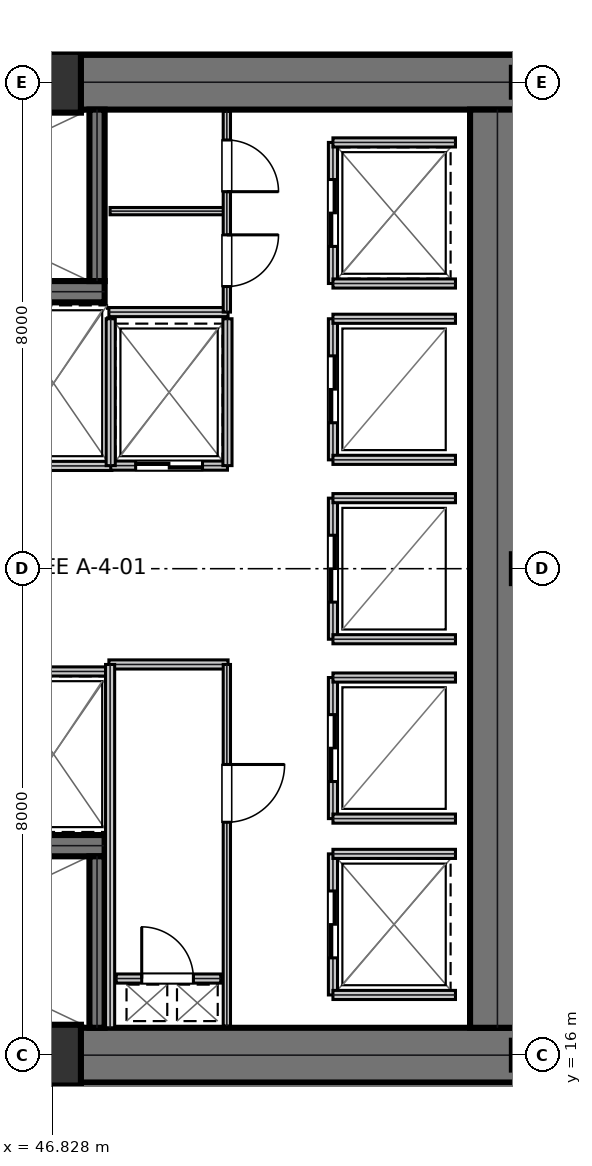
"""IFC4 building model, lengths in metres.
Left out: names, types, materials, properties, quantities, classifications, styles, units other than length and angle.
Written with IfcOpenShell. Run it as: python <this file> out.ifc"""

import sys

from ifc_helpers import new_model, si_unit, direction, frame, frame_2d, origin, origin_2d, place, context, subcontext, project, spatial, rectangle, extrude, element, fill, save


model = new_model("IFC4")
c1 = context("Model", 3, precision=1e-05, world=origin(), true_north=direction((0.0, 1.0)))
c2 = subcontext(c1, "Body", "Model", "MODEL_VIEW")
j1 = project(units=[si_unit("LENGTHUNIT", "METRE"), si_unit("PLANEANGLEUNIT", "RADIAN")], contexts=[c1])
p1 = place(None, origin())
s1 = spatial("IfcSite", under=j1, at=p1, CompositionType="ELEMENT")
p2 = place(p1, origin())
s2 = spatial("IfcBuilding", under=s1, at=p2, CompositionType="ELEMENT")
p3 = place(p2, origin())
s3 = spatial("IfcBuildingStorey", under=s2, at=p3, CompositionType="ELEMENT", Elevation=0.0)
for number, where, z_axis, x_axis in (
    (1, (38.8, 32.0, 0.0), (0.0, 0.0, 1.0), (1.0, 0.0, 0.0)),
    (2, (38.8, 16.0, 0.0), (0.0, 0.0, 1.0), (1.0, 0.0, 0.0)),
):
    element("IfcWall", number, at=place(p3, frame(where, z_axis=z_axis, x_axis=x_axis)), inside=s3, PredefinedType="SHEAR", context=c2, shape_type="SweptSolid", body=[
        extrude(rectangle(XDim=16.0, YDim=0.9, at=frame_2d((8.0, 0.0))), origin(), (0.0, 0.0, 1.0), 5.12),
    ])
p4 = place(p3, frame((54.15, 16.45, 0.0), z_axis=(0.0, 0.0, 1.0), x_axis=(0.0, 1.0, 0.0)))
e3 = element("IfcWall", 3, at=p4, inside=s3, PredefinedType="SHEAR", context=c2, shape_type="SweptSolid", body=[
    extrude(rectangle(XDim=15.1, YDim=0.9, at=frame_2d((7.55, 0.0))), origin(), (0.0, 0.0, 1.0), 5.12),
])
p5 = place(p3, frame((39.98, 28.555, 0.0), z_axis=(0.0, 0.0, 1.0), x_axis=(1.0, 0.0, 0.0)))
e4 = element("IfcWall", 4, at=p5, inside=s3, PredefinedType="SHEAR", context=c2, shape_type="SweptSolid", body=[
    extrude(rectangle(XDim=7.71, YDim=0.35, at=frame_2d((3.855, 0.0))), origin(), (0.0, 0.0, 1.0), 5.12),
])
p6 = place(p5, frame((0.25, 0.0, 0.0)))
e5 = element("IfcOpeningElement", 5, at=p6, cuts=e4, PredefinedType="OPENING", context=c2, shape_type="SweptSolid", body=[
    extrude(rectangle(XDim=1.1, YDim=2.15, at=frame_2d((0.55, 1.075))), frame((0.0, 0.185, 0.0), z_axis=(0.0, -1.0, 0.0), x_axis=(1.0, 0.0, 0.0)), (0.0, 0.0, 1.0), 0.37),
])
p7 = place(p3, frame((39.98, 19.445, 0.0), z_axis=(0.0, 0.0, 1.0), x_axis=(1.0, 0.0, 0.0)))
e6 = element("IfcWall", 6, at=p7, inside=s3, PredefinedType="SHEAR", context=c2, shape_type="SweptSolid", body=[
    extrude(rectangle(XDim=7.71, YDim=0.35, at=frame_2d((3.855, 0.0))), origin(), (0.0, 0.0, 1.0), 5.12),
])
p8 = place(p7, frame((0.25, 0.0, 0.0)))
e7 = element("IfcOpeningElement", 7, at=p8, cuts=e6, PredefinedType="OPENING", context=c2, shape_type="SweptSolid", body=[
    extrude(rectangle(XDim=1.1, YDim=2.15, at=frame_2d((0.55, 1.075))), frame((0.0, 0.185, 0.0), z_axis=(0.0, -1.0, 0.0), x_axis=(1.0, 0.0, 0.0)), (0.0, 0.0, 1.0), 0.37),
])
for number, where, z_axis, x_axis in (
    (8, (47.565, 28.73, 0.0), (0.0, 0.0, 1.0), (0.0, 1.0, 0.0)),
    (9, (47.565, 16.45, 0.0), (0.0, 0.0, 1.0), (0.0, 1.0, 0.0)),
):
    element("IfcWall", number, at=place(p3, frame(where, z_axis=z_axis, x_axis=x_axis)), inside=s3, PredefinedType="SHEAR", context=c2, shape_type="SweptSolid", body=[
        extrude(rectangle(XDim=2.82, YDim=0.25, at=frame_2d((1.41, 0.0))), origin(), (0.0, 0.0, 1.0), 5.12),
    ])
for number, where, z_axis, x_axis in (
    (10, (46.8, 16.0, 0.0), (0.0, 0.0, 1.0), (1.0, 0.0, 0.0)),
    (11, (46.8, 32.0, 0.0), (0.0, 0.0, 1.0), (1.0, 0.0, 0.0)),
):
    element("IfcColumn", number, at=place(p3, frame(where, z_axis=z_axis, x_axis=x_axis)), inside=s3, PredefinedType="COLUMN", context=c2, shape_type="SweptSolid", body=[
        extrude(rectangle(XDim=1.0, YDim=1.0, at=origin_2d()), origin(), (0.0, 0.0, 1.0), 5.395),
    ])
for number, where, z_axis, x_axis in (
    (12, (45.895, 25.69, 0.0), (0.0, 0.0, 1.0), (1.0, 0.0, 0.0)),
    (13, (45.895, 22.31, 0.0), (0.0, 0.0, 1.0), (1.0, 0.0, 0.0)),
):
    element("IfcWall", number, at=place(p3, frame(where, z_axis=z_axis, x_axis=x_axis)), inside=s3, PredefinedType="PARTITIONING", context=c2, shape_type="SweptSolid", body=[
        extrude(rectangle(XDim=1.915, YDim=0.15, at=frame_2d((0.958, 0.0))), origin(), (0.0, 0.0, 1.0), 5.12),
    ])
p9 = place(p3, frame((47.79, 25.695, 0.0), z_axis=(0.0, 0.0, 1.0), x_axis=(1.0, 0.0, 0.0)))
e14 = element("IfcWall", 14, at=p9, inside=s3, PredefinedType="PARTITIONING", context=c2, shape_type="SweptSolid", body=[
    extrude(rectangle(XDim=1.92, YDim=0.15, at=frame_2d((0.96, 0.0))), origin(), (0.0, 0.0, 1.0), 5.12),
])
p10 = place(p9, frame((0.41, 0.0, 0.0)))
e15 = element("IfcOpeningElement", 15, at=p10, cuts=e14, PredefinedType="OPENING", context=c2, shape_type="SweptSolid", body=[
    extrude(rectangle(XDim=1.1, YDim=2.15, at=frame_2d((0.55, 1.075))), frame((0.0, 0.085, 0.0), z_axis=(0.0, -1.0, 0.0), x_axis=(1.0, 0.0, 0.0)), (0.0, 0.0, 1.0), 0.17),
])
for number, where, z_axis, x_axis in (
    (16, (47.79, 25.695, 0.0), (0.0, 0.0, 1.0), (0.0, 1.0, 0.0)),
    (17, (49.71, 25.695, 0.0), (0.0, 0.0, 1.0), (0.0, 1.0, 0.0)),
):
    element("IfcWall", number, at=place(p3, frame(where, z_axis=z_axis, x_axis=x_axis)), inside=s3, PredefinedType="PARTITIONING", context=c2, shape_type="SweptSolid", body=[
        extrude(rectangle(XDim=2.415, YDim=0.15, at=frame_2d((1.208, 0.0))), origin(), (0.0, 0.0, 1.0), 5.12),
    ])
p11 = place(p3, frame((51.445, 28.69, 0.0), z_axis=(0.0, 0.0, 1.0), x_axis=(0.0, 1.0, 0.0)))
e18 = element("IfcWall", 18, at=p11, inside=s3, PredefinedType="PARTITIONING", context=c2, shape_type="SweptSolid", body=[
    extrude(rectangle(XDim=2.32, YDim=0.15, at=frame_2d((1.16, 0.0))), origin(), (0.0, 0.0, 1.0), 5.12),
])
p12 = place(p11, frame((0.61, 0.0, 0.0)))
e19 = element("IfcOpeningElement", 19, at=p12, cuts=e18, PredefinedType="OPENING", context=c2, shape_type="SweptSolid", body=[
    extrude(rectangle(XDim=1.1, YDim=2.15, at=frame_2d((0.55, 1.075))), frame((0.0, 0.085, 0.0), z_axis=(0.0, -1.0, 0.0), x_axis=(1.0, 0.0, 0.0)), (0.0, 0.0, 1.0), 0.17),
])
for number, where, z_axis, x_axis in (
    (20, (51.445, 28.69, 0.0), (0.0, 0.0, 1.0), (1.0, 0.0, 0.0)),
    (21, (51.445, 31.01, 0.0), (0.0, 0.0, 1.0), (1.0, 0.0, 0.0)),
):
    element("IfcWall", number, at=place(p3, frame(where, z_axis=z_axis, x_axis=x_axis)), inside=s3, PredefinedType="PARTITIONING", context=c2, shape_type="SweptSolid", body=[
        extrude(rectangle(XDim=2.015, YDim=0.15, at=frame_2d((1.007, 0.0))), origin(), (0.0, 0.0, 1.0), 5.12),
    ])
p13 = place(p3, frame((51.445, 25.79, 0.0), z_axis=(0.0, 0.0, 1.0), x_axis=(0.0, 1.0, 0.0)))
e22 = element("IfcWall", 22, at=p13, inside=s3, PredefinedType="PARTITIONING", context=c2, shape_type="SweptSolid", body=[
    extrude(rectangle(XDim=2.32, YDim=0.15, at=frame_2d((1.16, 0.0))), origin(), (0.0, 0.0, 1.0), 5.12),
])
p14 = place(p13, frame((0.61, 0.0, 0.0)))
e23 = element("IfcOpeningElement", 23, at=p14, cuts=e22, PredefinedType="OPENING", context=c2, shape_type="SweptSolid", body=[
    extrude(rectangle(XDim=1.1, YDim=2.15, at=frame_2d((0.55, 1.075))), frame((0.0, 0.085, 0.0), z_axis=(0.0, -1.0, 0.0), x_axis=(1.0, 0.0, 0.0)), (0.0, 0.0, 1.0), 0.17),
])
for number, where, z_axis, x_axis in (
    (24, (51.445, 25.79, 0.0), (0.0, 0.0, 1.0), (1.0, 0.0, 0.0)),
    (25, (51.445, 28.11, 0.0), (0.0, 0.0, 1.0), (1.0, 0.0, 0.0)),
):
    element("IfcWall", number, at=place(p3, frame(where, z_axis=z_axis, x_axis=x_axis)), inside=s3, PredefinedType="PARTITIONING", context=c2, shape_type="SweptSolid", body=[
        extrude(rectangle(XDim=2.015, YDim=0.15, at=frame_2d((1.007, 0.0))), origin(), (0.0, 0.0, 1.0), 5.12),
    ])
p15 = place(p3, frame((51.445, 19.89, 0.0), z_axis=(0.0, 0.0, 1.0), x_axis=(0.0, 1.0, 0.0)))
e26 = element("IfcWall", 26, at=p15, inside=s3, PredefinedType="PARTITIONING", context=c2, shape_type="SweptSolid", body=[
    extrude(rectangle(XDim=2.32, YDim=0.15, at=frame_2d((1.16, 0.0))), origin(), (0.0, 0.0, 1.0), 5.12),
])
p16 = place(p15, frame((0.61, 0.0, 0.0)))
e27 = element("IfcOpeningElement", 27, at=p16, cuts=e26, PredefinedType="OPENING", context=c2, shape_type="SweptSolid", body=[
    extrude(rectangle(XDim=1.1, YDim=2.15, at=frame_2d((0.55, 1.075))), frame((0.0, 0.085, 0.0), z_axis=(0.0, -1.0, 0.0), x_axis=(1.0, 0.0, 0.0)), (0.0, 0.0, 1.0), 0.17),
])
for number, where, z_axis, x_axis in (
    (28, (51.445, 19.89, 0.0), (0.0, 0.0, 1.0), (1.0, 0.0, 0.0)),
    (29, (51.445, 22.21, 0.0), (0.0, 0.0, 1.0), (1.0, 0.0, 0.0)),
):
    element("IfcWall", number, at=place(p3, frame(where, z_axis=z_axis, x_axis=x_axis)), inside=s3, PredefinedType="PARTITIONING", context=c2, shape_type="SweptSolid", body=[
        extrude(rectangle(XDim=2.015, YDim=0.15, at=frame_2d((1.007, 0.0))), origin(), (0.0, 0.0, 1.0), 5.12),
    ])
p17 = place(p3, frame((51.445, 22.84, 0.0), z_axis=(0.0, 0.0, 1.0), x_axis=(0.0, 1.0, 0.0)))
e30 = element("IfcWall", 30, at=p17, inside=s3, PredefinedType="PARTITIONING", context=c2, shape_type="SweptSolid", body=[
    extrude(rectangle(XDim=2.32, YDim=0.15, at=frame_2d((1.16, 0.0))), origin(), (0.0, 0.0, 1.0), 5.12),
])
p18 = place(p17, frame((0.61, 0.0, 0.0)))
e31 = element("IfcOpeningElement", 31, at=p18, cuts=e30, PredefinedType="OPENING", context=c2, shape_type="SweptSolid", body=[
    extrude(rectangle(XDim=1.1, YDim=2.15, at=frame_2d((0.55, 1.075))), frame((0.0, 0.085, 0.0), z_axis=(0.0, -1.0, 0.0), x_axis=(1.0, 0.0, 0.0)), (0.0, 0.0, 1.0), 0.17),
])
for number, where, z_axis, x_axis in (
    (32, (51.445, 22.84, 0.0), (0.0, 0.0, 1.0), (1.0, 0.0, 0.0)),
    (33, (51.445, 25.16, 0.0), (0.0, 0.0, 1.0), (1.0, 0.0, 0.0)),
):
    element("IfcWall", number, at=place(p3, frame(where, z_axis=z_axis, x_axis=x_axis)), inside=s3, PredefinedType="PARTITIONING", context=c2, shape_type="SweptSolid", body=[
        extrude(rectangle(XDim=2.015, YDim=0.15, at=frame_2d((1.007, 0.0))), origin(), (0.0, 0.0, 1.0), 5.12),
    ])
p19 = place(p3, frame((51.445, 16.99, 0.0), z_axis=(0.0, 0.0, 1.0), x_axis=(0.0, 1.0, 0.0)))
e34 = element("IfcWall", 34, at=p19, inside=s3, PredefinedType="PARTITIONING", context=c2, shape_type="SweptSolid", body=[
    extrude(rectangle(XDim=2.32, YDim=0.15, at=frame_2d((1.16, 0.0))), origin(), (0.0, 0.0, 1.0), 5.12),
])
p20 = place(p19, frame((0.61, 0.0, 0.0)))
e35 = element("IfcOpeningElement", 35, at=p20, cuts=e34, PredefinedType="OPENING", context=c2, shape_type="SweptSolid", body=[
    extrude(rectangle(XDim=1.1, YDim=2.15, at=frame_2d((0.55, 1.075))), frame((0.0, 0.085, 0.0), z_axis=(0.0, -1.0, 0.0), x_axis=(1.0, 0.0, 0.0)), (0.0, 0.0, 1.0), 0.17),
])
for number, where, z_axis, x_axis in (
    (36, (51.445, 16.99, 0.0), (0.0, 0.0, 1.0), (1.0, 0.0, 0.0)),
    (37, (51.445, 19.31, 0.0), (0.0, 0.0, 1.0), (1.0, 0.0, 0.0)),
):
    element("IfcWall", number, at=place(p3, frame(where, z_axis=z_axis, x_axis=x_axis)), inside=s3, PredefinedType="PARTITIONING", context=c2, shape_type="SweptSolid", body=[
        extrude(rectangle(XDim=2.015, YDim=0.15, at=frame_2d((1.007, 0.0))), origin(), (0.0, 0.0, 1.0), 5.12),
    ])
p21 = place(p3, frame((47.88, 17.26, 0.0), z_axis=(0.0, 0.0, 1.0), x_axis=(1.0, 0.0, 0.0)))
e38 = element("IfcWall", 38, at=p21, inside=s3, PredefinedType="PARTITIONING", context=c2, shape_type="SweptSolid", body=[
    extrude(rectangle(XDim=1.72, YDim=0.15, at=frame_2d((0.86, 0.0))), origin(), (0.0, 0.0, 1.0), 5.12),
])
p22 = place(p21, frame((0.42, 0.0, 0.0)))
e39 = element("IfcOpeningElement", 39, at=p22, cuts=e38, PredefinedType="OPENING", context=c2, shape_type="SweptSolid", body=[
    extrude(rectangle(XDim=0.85, YDim=2.15, at=frame_2d((0.425, 1.075))), frame((0.0, 0.085, 0.0), z_axis=(0.0, -1.0, 0.0), x_axis=(1.0, 0.0, 0.0)), (0.0, 0.0, 1.0), 0.17),
])
p23 = place(p3, frame((47.76, 22.425, 0.0), z_axis=(0.0, 0.0, 1.0), x_axis=(1.0, 0.0, 0.0)))
e40 = element("IfcWall", 40, at=p23, inside=s3, PredefinedType="PARTITIONING", context=c2, shape_type="SweptSolid", body=[
    extrude(rectangle(XDim=1.96, YDim=0.15, at=frame_2d((0.98, 0.0))), origin(), (0.0, 0.0, 1.0), 5.12),
])
p24 = place(p3, frame((47.78, 16.45, 0.0), z_axis=(0.0, 0.0, 1.0), x_axis=(0.0, 1.0, 0.0)))
e41 = element("IfcWall", 41, at=p24, inside=s3, PredefinedType="PARTITIONING", context=c2, shape_type="SweptSolid", body=[
    extrude(rectangle(XDim=5.975, YDim=0.15, at=frame_2d((2.988, 0.0))), origin(), (0.0, 0.0, 1.0), 5.12),
])
p25 = place(p3, frame((49.7, 16.48, 0.0), z_axis=(0.0, 0.0, 1.0), x_axis=(0.0, 1.0, 0.0)))
e42 = element("IfcWall", 42, at=p25, inside=s3, PredefinedType="PARTITIONING", context=c2, shape_type="SweptSolid", body=[
    extrude(rectangle(XDim=5.945, YDim=0.12, at=frame_2d((2.973, 0.0))), origin(), (0.0, 0.0, 1.0), 5.12),
])
p26 = place(p25, frame((3.35, 0.0, 0.0)))
e43 = element("IfcOpeningElement", 43, at=p26, cuts=e42, PredefinedType="OPENING", context=c2, shape_type="SweptSolid", body=[
    extrude(rectangle(XDim=0.95, YDim=2.15, at=frame_2d((0.475, 1.075))), frame((0.0, 0.07, 0.0), z_axis=(0.0, -1.0, 0.0), x_axis=(1.0, 0.0, 0.0)), (0.0, 0.0, 1.0), 0.14),
])
p27 = place(p3, frame((47.76, 28.22, 0.0), z_axis=(0.0, 0.0, 1.0), x_axis=(1.0, 0.0, 0.0)))
e44 = element("IfcWall", 44, at=p27, inside=s3, PredefinedType="PARTITIONING", context=c2, shape_type="SweptSolid", body=[
    extrude(rectangle(XDim=1.96, YDim=0.15, at=frame_2d((0.98, 0.0))), origin(), (0.0, 0.0, 1.0), 5.12),
])
p28 = place(p3, frame((47.78, 29.88, 0.0), z_axis=(0.0, 0.0, 1.0), x_axis=(1.0, 0.0, 0.0)))
e45 = element("IfcWall", 45, at=p28, inside=s3, PredefinedType="PARTITIONING", context=c2, shape_type="SweptSolid", body=[
    extrude(rectangle(XDim=1.92, YDim=0.12, at=frame_2d((0.96, 0.0))), origin(), (0.0, 0.0, 1.0), 5.12),
])
p29 = place(p3, frame((49.7, 28.22, 0.0), z_axis=(0.0, 0.0, 1.0), x_axis=(0.0, 1.0, 0.0)))
e46 = element("IfcWall", 46, at=p29, inside=s3, PredefinedType="PARTITIONING", context=c2, shape_type="SweptSolid", body=[
    extrude(rectangle(XDim=3.3, YDim=0.12, at=frame_2d((1.65, 0.0))), origin(), (0.0, 0.0, 1.0), 5.12),
])
p30 = place(p29, frame((0.42, 0.0, 0.0)))
e47 = element("IfcOpeningElement", 47, at=p30, cuts=e46, PredefinedType="OPENING", context=c2, shape_type="SweptSolid", body=[
    extrude(rectangle(XDim=0.85, YDim=2.15, at=frame_2d((0.425, 1.075))), frame((0.0, 0.07, 0.0), z_axis=(0.0, -1.0, 0.0), x_axis=(1.0, 0.0, 0.0)), (0.0, 0.0, 1.0), 0.14),
])
p31 = place(p29, frame((1.98, 0.0, 0.0)))
e48 = element("IfcOpeningElement", 48, at=p31, cuts=e46, PredefinedType="OPENING", context=c2, shape_type="SweptSolid", body=[
    extrude(rectangle(XDim=0.85, YDim=2.15, at=frame_2d((0.425, 1.075))), frame((0.0, 0.07, 0.0), z_axis=(0.0, -1.0, 0.0), x_axis=(1.0, 0.0, 0.0)), (0.0, 0.0, 1.0), 0.14),
])
p32 = place(p10, frame((1.1, 0.0, 0.0), z_axis=(0.0, 0.0, 1.0), x_axis=(-1.0, 0.0, 0.0)))
e49 = element("IfcDoor", 49, at=p32, inside=s3, OperationType="DOUBLE_DOOR_SLIDING", PredefinedType="DOOR", context=c2, shape_type="SweptSolid", body=[
    extrude(rectangle(XDim=1.1, YDim=2.15, at=frame_2d((0.55, 1.075))), frame((0.0, 0.025, 0.0), z_axis=(0.0, -1.0, 0.0), x_axis=(1.0, 0.0, 0.0)), (0.0, 0.0, 1.0), 0.05),
])
fill(e15, e49)
p33 = place(p12, frame((1.1, 0.0, 0.0), z_axis=(0.0, 0.0, 1.0), x_axis=(-1.0, 0.0, 0.0)))
e50 = element("IfcDoor", 50, at=p33, inside=s3, OperationType="DOUBLE_DOOR_SLIDING", PredefinedType="DOOR", context=c2, shape_type="SweptSolid", body=[
    extrude(rectangle(XDim=1.1, YDim=2.15, at=frame_2d((0.55, 1.075))), frame((0.0, 0.025, 0.0), z_axis=(0.0, -1.0, 0.0), x_axis=(1.0, 0.0, 0.0)), (0.0, 0.0, 1.0), 0.05),
])
fill(e19, e50)
p34 = place(p14, frame((1.1, 0.0, 0.0), z_axis=(0.0, 0.0, 1.0), x_axis=(-1.0, 0.0, 0.0)))
e51 = element("IfcDoor", 51, at=p34, inside=s3, OperationType="DOUBLE_DOOR_SLIDING", PredefinedType="DOOR", context=c2, shape_type="SweptSolid", body=[
    extrude(rectangle(XDim=1.1, YDim=2.15, at=frame_2d((0.55, 1.075))), frame((0.0, 0.025, 0.0), z_axis=(0.0, -1.0, 0.0), x_axis=(1.0, 0.0, 0.0)), (0.0, 0.0, 1.0), 0.05),
])
fill(e23, e51)
p35 = place(p16, frame((1.1, 0.0, 0.0), z_axis=(0.0, 0.0, 1.0), x_axis=(-1.0, 0.0, 0.0)))
e52 = element("IfcDoor", 52, at=p35, inside=s3, OperationType="DOUBLE_DOOR_SLIDING", PredefinedType="DOOR", context=c2, shape_type="SweptSolid", body=[
    extrude(rectangle(XDim=1.1, YDim=2.15, at=frame_2d((0.55, 1.075))), frame((0.0, 0.025, 0.0), z_axis=(0.0, -1.0, 0.0), x_axis=(1.0, 0.0, 0.0)), (0.0, 0.0, 1.0), 0.05),
])
fill(e27, e52)
p36 = place(p18, frame((1.1, 0.0, 0.0), z_axis=(0.0, 0.0, 1.0), x_axis=(-1.0, 0.0, 0.0)))
e53 = element("IfcDoor", 53, at=p36, inside=s3, OperationType="DOUBLE_DOOR_SLIDING", PredefinedType="DOOR", context=c2, shape_type="SweptSolid", body=[
    extrude(rectangle(XDim=1.1, YDim=2.15, at=frame_2d((0.55, 1.075))), frame((0.0, 0.025, 0.0), z_axis=(0.0, -1.0, 0.0), x_axis=(1.0, 0.0, 0.0)), (0.0, 0.0, 1.0), 0.05),
])
fill(e31, e53)
p37 = place(p20, frame((1.1, 0.0, 0.0), z_axis=(0.0, 0.0, 1.0), x_axis=(-1.0, 0.0, 0.0)))
e54 = element("IfcDoor", 54, at=p37, inside=s3, OperationType="DOUBLE_DOOR_SLIDING", PredefinedType="DOOR", context=c2, shape_type="SweptSolid", body=[
    extrude(rectangle(XDim=1.1, YDim=2.15, at=frame_2d((0.55, 1.075))), frame((0.0, 0.025, 0.0), z_axis=(0.0, -1.0, 0.0), x_axis=(1.0, 0.0, 0.0)), (0.0, 0.0, 1.0), 0.05),
])
fill(e35, e54)
p38 = place(p22, origin())
e55 = element("IfcDoor", 55, at=p38, inside=s3, OperationType="SINGLE_SWING_LEFT", PredefinedType="TRAPDOOR", context=c2, shape_type="SweptSolid", body=[
    extrude(rectangle(XDim=0.85, YDim=2.15, at=frame_2d((0.425, 1.075))), frame((0.0, 0.025, 0.0), z_axis=(0.0, -1.0, 0.0), x_axis=(1.0, 0.0, 0.0)), (0.0, 0.0, 1.0), 0.05),
])
fill(e39, e55)
p39 = place(p26, frame((0.95, 0.0, 0.0), z_axis=(0.0, 0.0, 1.0), x_axis=(-1.0, 0.0, 0.0)))
e56 = element("IfcDoor", 56, at=p39, inside=s3, OperationType="SINGLE_SWING_LEFT", PredefinedType="DOOR", context=c2, shape_type="SweptSolid", body=[
    extrude(rectangle(XDim=0.95, YDim=2.15, at=frame_2d((0.475, 1.075))), frame((0.0, 0.025, 0.0), z_axis=(0.0, -1.0, 0.0), x_axis=(1.0, 0.0, 0.0)), (0.0, 0.0, 1.0), 0.05),
])
fill(e43, e56)
p40 = place(p30, frame((0.85, 0.0, 0.0), z_axis=(0.0, 0.0, 1.0), x_axis=(-1.0, 0.0, 0.0)))
e57 = element("IfcDoor", 57, at=p40, inside=s3, OperationType="SINGLE_SWING_LEFT", PredefinedType="DOOR", context=c2, shape_type="SweptSolid", body=[
    extrude(rectangle(XDim=0.85, YDim=2.15, at=frame_2d((0.425, 1.075))), frame((0.0, 0.025, 0.0), z_axis=(0.0, -1.0, 0.0), x_axis=(1.0, 0.0, 0.0)), (0.0, 0.0, 1.0), 0.05),
])
fill(e47, e57)
p41 = place(p31, frame((0.85, 0.0, 0.0), z_axis=(0.0, 0.0, 1.0), x_axis=(-1.0, 0.0, 0.0)))
e58 = element("IfcDoor", 58, at=p41, inside=s3, OperationType="SINGLE_SWING_RIGHT", PredefinedType="DOOR", context=c2, shape_type="SweptSolid", body=[
    extrude(rectangle(XDim=0.85, YDim=2.15, at=frame_2d((0.425, 1.075))), frame((0.0, 0.025, 0.0), z_axis=(0.0, -1.0, 0.0), x_axis=(1.0, 0.0, 0.0)), (0.0, 0.0, 1.0), 0.05),
])
fill(e48, e58)
save(model, sys.argv[1])
